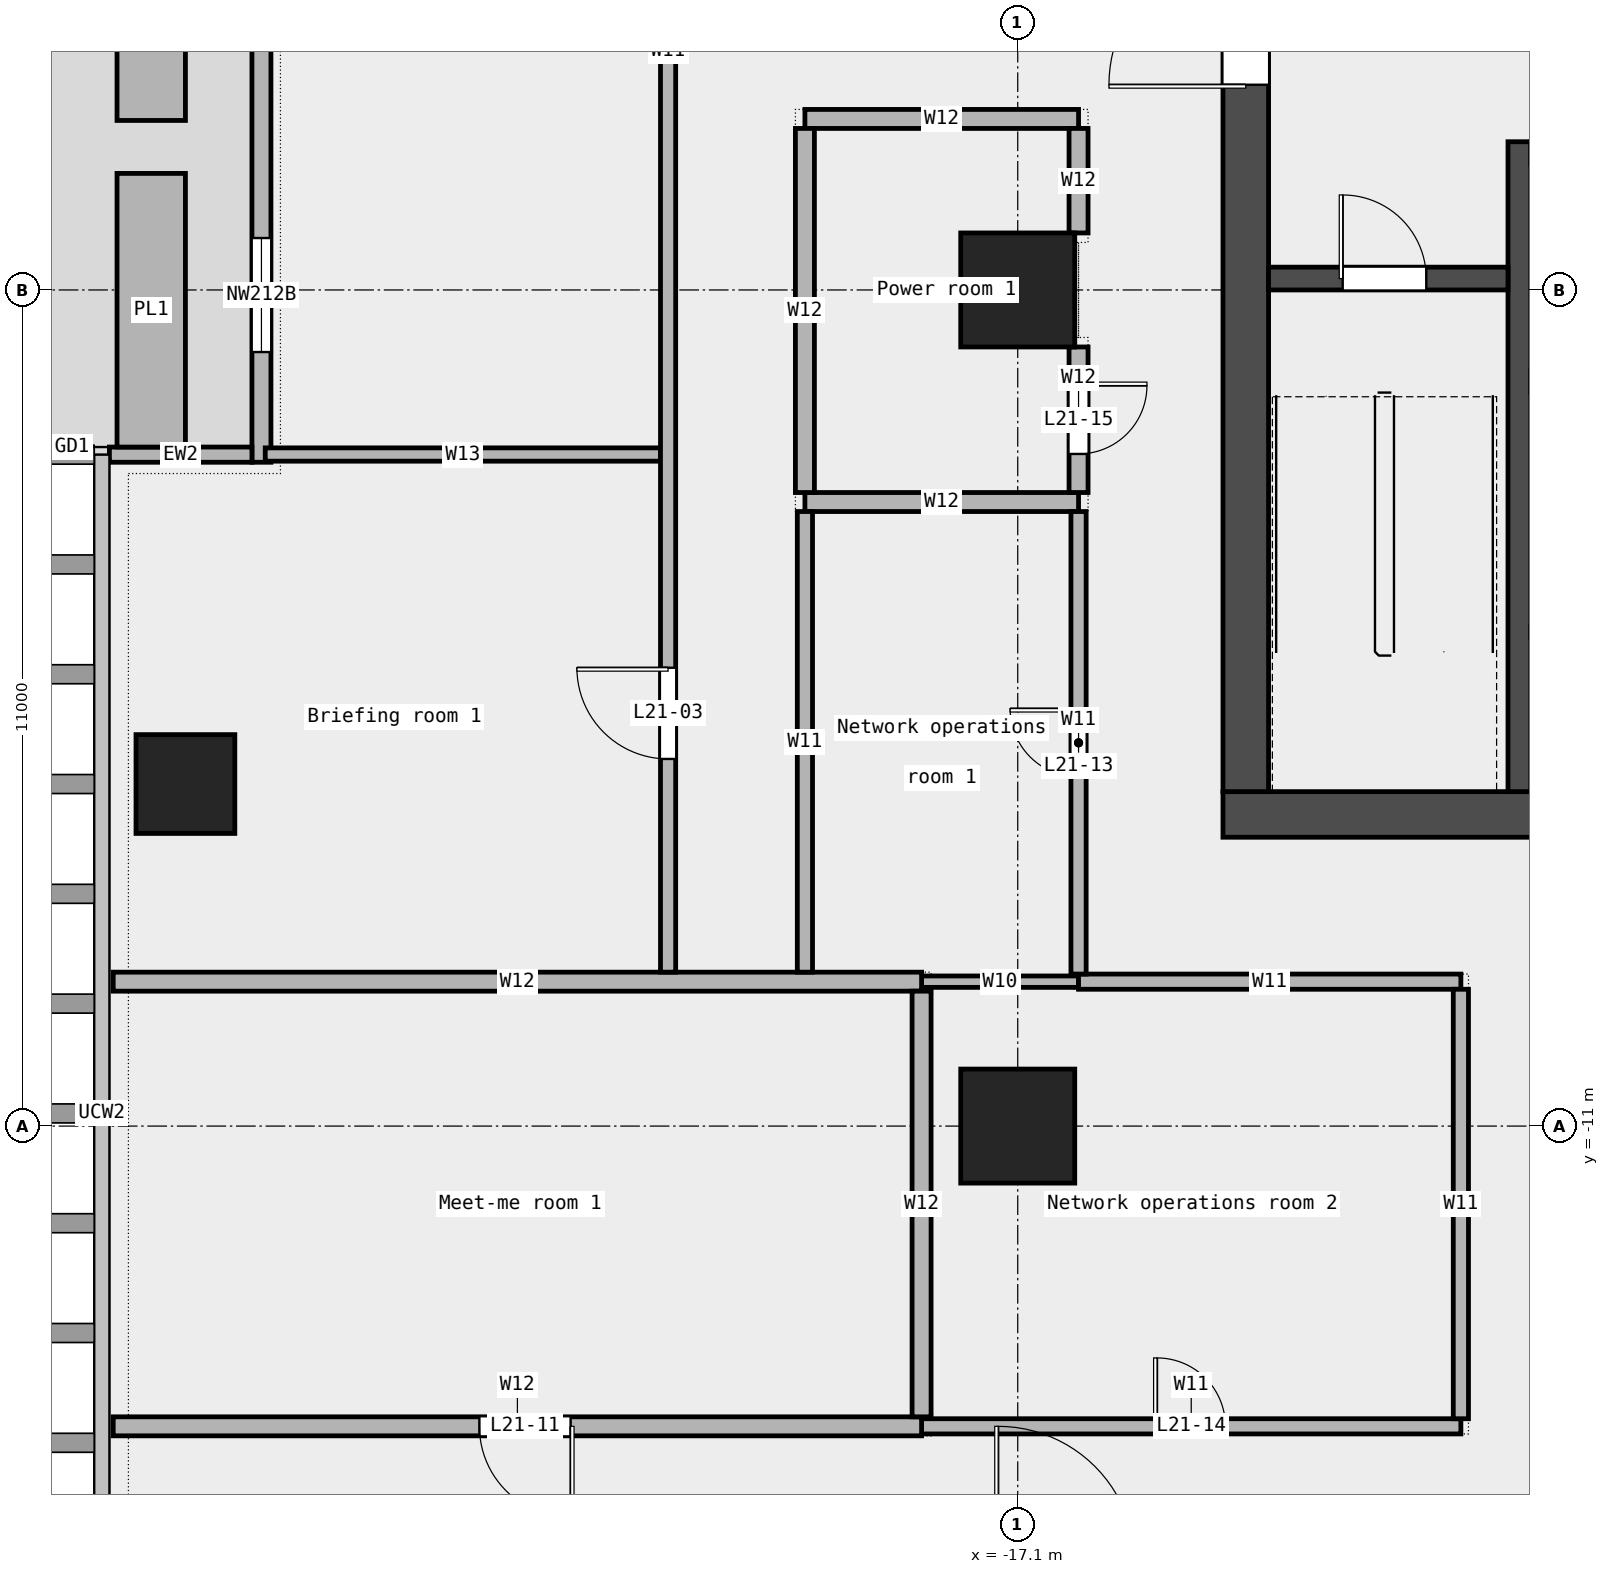
"""IFC4 building model, lengths in metres.
Left out: names, types, materials, properties, quantities, classifications, styles, units other than length and angle.
Written with IfcOpenShell. Run it as: python <this file> out.ifc"""

import sys

from ifc_helpers import new_model, si_unit, direction, frame, frame_2d, origin, origin_2d, place, context, subcontext, project, spatial, rectangle, extrude, element, fill, save


model = new_model("IFC4")
c1 = context("Model", 3, precision=1e-05, world=origin(), true_north=direction((0.0, 1.0)))
c2 = subcontext(c1, "Body", "Model", "MODEL_VIEW")
j1 = project(units=[si_unit("LENGTHUNIT", "METRE"), si_unit("PLANEANGLEUNIT", "RADIAN")], contexts=[c1])
p1 = place(None, origin())
s1 = spatial("IfcSite", under=j1, at=p1, CompositionType="ELEMENT")
p2 = place(p1, origin())
s2 = spatial("IfcBuilding", under=s1, at=p2, CompositionType="ELEMENT")
p3 = place(p2, frame((0.0, 0.0, 108.1)))
s3 = spatial("IfcBuildingStorey", under=s2, at=p3, CompositionType="ELEMENT", Elevation=108.1)
p4 = place(p3, frame((-28.05, -6.5, 0.0), z_axis=(0.0, 0.0, 1.0), x_axis=(1.0, 0.0, 0.0)))
e1 = element("IfcColumn", 1, at=p4, inside=s3, PredefinedType="COLUMN", context=c2, shape_type="SweptSolid", body=[
    extrude(rectangle(XDim=1.3, YDim=1.3, at=origin_2d()), origin(), (0.0, 0.0, 1.0), 4.05),
])
for number, where, z_axis, x_axis in (
    (2, (-17.1, -11.0, 0.0), (0.0, 0.0, 1.0), (1.0, 0.0, 0.0)),
    (3, (-17.1, 0.0, 0.0), (0.0, 0.0, 1.0), (1.0, 0.0, 0.0)),
):
    element("IfcColumn", number, at=place(p3, frame(where, z_axis=z_axis, x_axis=x_axis)), inside=s3, PredefinedType="COLUMN", context=c2, shape_type="SweptSolid", body=[
        extrude(rectangle(XDim=1.5, YDim=1.5, at=origin_2d()), origin(), (0.0, 0.0, 1.0), 4.05),
    ])
p5 = place(p3, frame((-27.05, 10.933, 0.0), z_axis=(0.0, 0.0, 1.0), x_axis=(0.0, -1.0, 0.0)))
e4 = element("IfcWall", 4, at=p5, inside=s3, PredefinedType="STANDARD", context=c2, shape_type="SweptSolid", body=[
    extrude(rectangle(XDim=13.2, YDim=0.25, at=frame_2d((6.6, 0.0))), origin(), (0.0, 0.0, 1.0), 4.05),
])
p6 = place(p5, frame((1.5, 0.0, 0.45)))
e5 = element("IfcOpeningElement", 5, at=p6, cuts=e4, PredefinedType="OPENING", context=c2, shape_type="SweptSolid", body=[
    extrude(rectangle(XDim=1.5, YDim=3.0, at=frame_2d((0.75, 1.5))), frame((0.0, 0.137, 0.0), z_axis=(0.0, -1.0, 0.0), x_axis=(1.0, 0.0, 0.0)), (0.0, 0.0, 1.0), 0.274),
])
p7 = place(p5, frame((5.75, 0.0, 0.0)))
e6 = element("IfcOpeningElement", 6, at=p7, cuts=e4, PredefinedType="OPENING", context=c2, shape_type="SweptSolid", body=[
    extrude(rectangle(XDim=1.8, YDim=2.4, at=frame_2d((0.9, 1.2))), frame((0.0, 0.137, 0.0), z_axis=(0.0, -1.0, 0.0), x_axis=(1.0, 0.0, 0.0)), (0.0, 0.0, 1.0), 0.274),
])
p8 = place(p5, frame((10.25, 0.0, 0.45)))
e7 = element("IfcOpeningElement", 7, at=p8, cuts=e4, PredefinedType="OPENING", context=c2, shape_type="SweptSolid", body=[
    extrude(rectangle(XDim=1.5, YDim=3.0, at=frame_2d((0.75, 1.5))), frame((0.0, 0.137, 0.0), z_axis=(0.0, -1.0, 0.0), x_axis=(1.0, 0.0, 0.0)), (0.0, 0.0, 1.0), 0.274),
])
p9 = place(p3, frame((-29.05, -2.167, 0.0), z_axis=(0.0, 0.0, 1.0), x_axis=(1.0, 0.0, 0.0)))
e8 = element("IfcWall", 8, at=p9, inside=s3, PredefinedType="STANDARD", context=c2, shape_type="SweptSolid", body=[
    extrude(rectangle(XDim=1.875, YDim=0.2, at=frame_2d((0.938, 0.0))), origin(), (0.0, 0.0, 1.0), 4.05),
])
for number, where, z_axis, x_axis in (
    (9, (-28.5, 5.83, 0.0), (0.0, 0.0, 1.0), (0.0, -1.0, 0.0)),
    (10, (-28.5, 1.533, 0.0), (0.0, 0.0, 1.0), (0.0, -1.0, 0.0)),
):
    element("IfcWall", number, at=place(p3, frame(where, z_axis=z_axis, x_axis=x_axis)), inside=s3, PredefinedType="STANDARD", context=c2, shape_type="SweptSolid", body=[
        extrude(rectangle(XDim=3.6, YDim=0.9, at=frame_2d((1.8, 0.0))), origin(), (0.0, 0.0, 1.0), 0.7),
    ])
p10 = place(p3, frame((-18.365, -14.95, 0.0), z_axis=(0.0, 0.0, 1.0), x_axis=(1.0, 0.0, 0.0)))
e11 = element("IfcWall", 11, at=p10, inside=s3, PredefinedType="PARTITIONING", context=c2, shape_type="SweptSolid", body=[
    extrude(rectangle(XDim=7.095, YDim=0.2, at=frame_2d((3.547, 0.0))), origin(), (0.0, 0.0, 1.0), 4.05),
])
p11 = place(p10, frame((3.097, 0.0, 0.0)))
e12 = element("IfcOpeningElement", 12, at=p11, cuts=e11, PredefinedType="OPENING", context=c2, shape_type="SweptSolid", body=[
    extrude(rectangle(XDim=0.9, YDim=2.1, at=frame_2d((0.45, 1.05))), frame((0.0, 0.112, 0.0), z_axis=(0.0, -1.0, 0.0), x_axis=(1.0, 0.0, 0.0)), (0.0, 0.0, 1.0), 0.224),
])
p12 = place(p3, frame((-29.0, -14.95, 0.0), z_axis=(0.0, 0.0, 1.0), x_axis=(1.0, 0.0, 0.0)))
e13 = element("IfcWall", 13, at=p12, inside=s3, PredefinedType="PARTITIONING", context=c2, shape_type="SweptSolid", body=[
    extrude(rectangle(XDim=10.635, YDim=0.25, at=frame_2d((5.317, 0.0))), origin(), (0.0, 0.0, 1.0), 4.05),
])
p13 = place(p12, frame((4.817, 0.0, 0.0)))
e14 = element("IfcOpeningElement", 14, at=p13, cuts=e13, PredefinedType="OPENING", context=c2, shape_type="SweptSolid", body=[
    extrude(rectangle(XDim=1.2, YDim=2.1, at=frame_2d((0.6, 1.05))), frame((0.0, 0.137, 0.0), z_axis=(0.0, -1.0, 0.0), x_axis=(1.0, 0.0, 0.0)), (0.0, 0.0, 1.0), 0.274),
])
p14 = place(p3, frame((-18.365, -9.1, 0.0), z_axis=(0.0, 0.0, 1.0), x_axis=(1.0, 0.0, 0.0)))
e15 = element("IfcWall", 15, at=p14, inside=s3, PredefinedType="PARTITIONING", context=c2, shape_type="SweptSolid", body=[
    extrude(rectangle(XDim=2.065, YDim=0.15, at=frame_2d((1.032, 0.0))), origin(), (0.0, 0.0, 1.0), 4.05),
])
p15 = place(p3, frame((-16.3, -9.1, 0.0), z_axis=(0.0, 0.0, 1.0), x_axis=(1.0, 0.0, 0.0)))
e16 = element("IfcWall", 16, at=p15, inside=s3, PredefinedType="PARTITIONING", context=c2, shape_type="SweptSolid", body=[
    extrude(rectangle(XDim=5.03, YDim=0.2, at=frame_2d((2.515, 0.0))), origin(), (0.0, 0.0, 1.0), 4.05),
])
p16 = place(p3, frame((-29.0, -9.1, 0.0), z_axis=(0.0, 0.0, 1.0), x_axis=(1.0, 0.0, 0.0)))
e17 = element("IfcWall", 17, at=p16, inside=s3, PredefinedType="PARTITIONING", context=c2, shape_type="SweptSolid", body=[
    extrude(rectangle(XDim=10.635, YDim=0.25, at=frame_2d((5.317, 0.0))), origin(), (0.0, 0.0, 1.0), 4.05),
])
p17 = place(p3, frame((-19.9, -2.79, 0.0), z_axis=(0.0, 0.0, 1.0), x_axis=(1.0, 0.0, 0.0)))
e18 = element("IfcWall", 18, at=p17, inside=s3, PredefinedType="PARTITIONING", context=c2, shape_type="SweptSolid", body=[
    extrude(rectangle(XDim=3.6, YDim=0.25, at=frame_2d((1.8, 0.0))), origin(), (0.0, 0.0, 1.0), 4.05),
])
p18 = place(p3, frame((-27.0, -2.165, 0.0), z_axis=(0.0, 0.0, 1.0), x_axis=(1.0, 0.0, 0.0)))
e19 = element("IfcWall", 19, at=p18, inside=s3, PredefinedType="PARTITIONING", context=c2, shape_type="SweptSolid", body=[
    extrude(rectangle(XDim=5.2, YDim=0.175, at=frame_2d((2.6, 0.0))), origin(), (0.0, 0.0, 1.0), 4.05),
])
p19 = place(p3, frame((-19.9, 2.25, 0.0), z_axis=(0.0, 0.0, 1.0), x_axis=(1.0, 0.0, 0.0)))
e20 = element("IfcWall", 20, at=p19, inside=s3, PredefinedType="PARTITIONING", context=c2, shape_type="SweptSolid", body=[
    extrude(rectangle(XDim=3.6, YDim=0.25, at=frame_2d((1.8, 0.0))), origin(), (0.0, 0.0, 1.0), 4.05),
])
p20 = place(p3, frame((-21.7, -8.975, 0.0), z_axis=(0.0, 0.0, 1.0), x_axis=(0.0, 1.0, 0.0)))
e21 = element("IfcWall", 21, at=p20, inside=s3, PredefinedType="PARTITIONING", context=c2, shape_type="SweptSolid", body=[
    extrude(rectangle(XDim=24.25, YDim=0.2, at=frame_2d((12.125, 0.0))), origin(), (0.0, 0.0, 1.0), 4.05),
])
p21 = place(p20, frame((2.805, 0.0, 0.0)))
e22 = element("IfcOpeningElement", 22, at=p21, cuts=e21, PredefinedType="OPENING", context=c2, shape_type="SweptSolid", body=[
    extrude(rectangle(XDim=1.2, YDim=2.1, at=frame_2d((0.6, 1.05))), frame((0.0, 0.112, 0.0), z_axis=(0.0, -1.0, 0.0), x_axis=(1.0, 0.0, 0.0)), (0.0, 0.0, 1.0), 0.224),
])
p22 = place(p20, frame((21.58, 0.0, 0.0)))
e23 = element("IfcOpeningElement", 23, at=p22, cuts=e21, PredefinedType="OPENING", context=c2, shape_type="SweptSolid", body=[
    extrude(rectangle(XDim=0.9, YDim=2.1, at=frame_2d((0.45, 1.05))), frame((0.0, 0.112, 0.0), z_axis=(0.0, -1.0, 0.0), x_axis=(1.0, 0.0, 0.0)), (0.0, 0.0, 1.0), 0.224),
])
p23 = place(p20, frame((12.71, 0.0, 0.0)))
e24 = element("IfcOpeningElement", 24, at=p23, cuts=e21, PredefinedType="OPENING", context=c2, shape_type="SweptSolid", body=[
    extrude(rectangle(XDim=1.2, YDim=2.1, at=frame_2d((0.6, 1.05))), frame((0.0, 0.112, 0.0), z_axis=(0.0, -1.0, 0.0), x_axis=(1.0, 0.0, 0.0)), (0.0, 0.0, 1.0), 0.224),
])
p24 = place(p3, frame((-19.9, -8.975, 0.0), z_axis=(0.0, 0.0, 1.0), x_axis=(0.0, 1.0, 0.0)))
e25 = element("IfcWall", 25, at=p24, inside=s3, PredefinedType="PARTITIONING", context=c2, shape_type="SweptSolid", body=[
    extrude(rectangle(XDim=6.06, YDim=0.2, at=frame_2d((3.03, 0.0))), origin(), (0.0, 0.0, 1.0), 4.05),
])
p25 = place(p3, frame((-19.9, -2.665, 0.0), z_axis=(0.0, 0.0, 1.0), x_axis=(0.0, 1.0, 0.0)))
e26 = element("IfcWall", 26, at=p25, inside=s3, PredefinedType="PARTITIONING", context=c2, shape_type="SweptSolid", body=[
    extrude(rectangle(XDim=4.79, YDim=0.25, at=frame_2d((2.395, 0.0))), origin(), (0.0, 0.0, 1.0), 4.05),
])
p26 = place(p3, frame((-18.365, -14.825, 0.0), z_axis=(0.0, 0.0, 1.0), x_axis=(0.0, 1.0, 0.0)))
e27 = element("IfcWall", 27, at=p26, inside=s3, PredefinedType="PARTITIONING", context=c2, shape_type="SweptSolid", body=[
    extrude(rectangle(XDim=5.6, YDim=0.25, at=frame_2d((2.8, 0.0))), origin(), (0.0, 0.0, 1.0), 4.05),
])
p27 = place(p3, frame((-16.3, -9.0, 0.0), z_axis=(0.0, 0.0, 1.0), x_axis=(0.0, 1.0, 0.0)))
e28 = element("IfcWall", 28, at=p27, inside=s3, PredefinedType="PARTITIONING", context=c2, shape_type="SweptSolid", body=[
    extrude(rectangle(XDim=6.085, YDim=0.2, at=frame_2d((3.042, 0.0))), origin(), (0.0, 0.0, 1.0), 4.05),
])
p28 = place(p27, frame((2.593, 0.0, 0.0)))
e29 = element("IfcOpeningElement", 29, at=p28, cuts=e28, PredefinedType="OPENING", context=c2, shape_type="SweptSolid", body=[
    extrude(rectangle(XDim=0.9, YDim=2.1, at=frame_2d((0.45, 1.05))), frame((0.0, 0.112, 0.0), z_axis=(0.0, -1.0, 0.0), x_axis=(1.0, 0.0, 0.0)), (0.0, 0.0, 1.0), 0.224),
])
p29 = place(p3, frame((-16.3, -2.665, 0.0), z_axis=(0.0, 0.0, 1.0), x_axis=(0.0, 1.0, 0.0)))
e30 = element("IfcWall", 30, at=p29, inside=s3, PredefinedType="PARTITIONING", context=c2, shape_type="SweptSolid", body=[
    extrude(rectangle(XDim=1.915, YDim=0.25, at=frame_2d((0.958, 0.0))), origin(), (0.0, 0.0, 1.0), 4.05),
])
p30 = place(p29, frame((0.508, 0.0, 0.0)))
e31 = element("IfcOpeningElement", 31, at=p30, cuts=e30, PredefinedType="OPENING", context=c2, shape_type="SweptSolid", body=[
    extrude(rectangle(XDim=0.9, YDim=2.1, at=frame_2d((0.45, 1.05))), frame((0.0, 0.137, 0.0), z_axis=(0.0, -1.0, 0.0), x_axis=(1.0, 0.0, 0.0)), (0.0, 0.0, 1.0), 0.274),
])
p31 = place(p3, frame((-16.3, 0.75, 0.0), z_axis=(0.0, 0.0, 1.0), x_axis=(0.0, 1.0, 0.0)))
e32 = element("IfcWall", 32, at=p31, inside=s3, PredefinedType="PARTITIONING", context=c2, shape_type="SweptSolid", body=[
    extrude(rectangle(XDim=1.375, YDim=0.25, at=frame_2d((0.688, 0.0))), origin(), (0.0, 0.0, 1.0), 4.05),
])
p32 = place(p3, frame((-11.27, -14.85, 0.0), z_axis=(0.0, 0.0, 1.0), x_axis=(0.0, 1.0, 0.0)))
e33 = element("IfcWall", 33, at=p32, inside=s3, PredefinedType="PARTITIONING", context=c2, shape_type="SweptSolid", body=[
    extrude(rectangle(XDim=5.65, YDim=0.2, at=frame_2d((2.825, 0.0))), origin(), (0.0, 0.0, 1.0), 4.05),
])
p33 = place(p3, frame((-14.4, -6.9, 0.0), z_axis=(0.0, 0.0, 1.0), x_axis=(1.0, 0.0, 0.0)))
e34 = element("IfcWall", 34, at=p33, inside=s3, PredefinedType="SHEAR", context=c2, shape_type="SweptSolid", body=[
    extrude(rectangle(XDim=28.8, YDim=0.6, at=frame_2d((14.4, 0.0))), origin(), (0.0, 0.0, 1.0), 4.2),
])
p34 = place(p33, frame((7.05, 0.0, 0.0)))
e35 = element("IfcOpeningElement", 35, at=p34, cuts=e34, PredefinedType="OPENING", context=c2, shape_type="SweptSolid", body=[
    extrude(rectangle(XDim=1.2, YDim=2.1, at=frame_2d((0.6, 1.05))), frame((0.0, 0.312, 0.0), z_axis=(0.0, -1.0, 0.0), x_axis=(1.0, 0.0, 0.0)), (0.0, 0.0, 1.0), 0.624),
])
p35 = place(p33, frame((11.837, 0.0, 0.0)))
e36 = element("IfcOpeningElement", 36, at=p35, cuts=e34, PredefinedType="OPENING", context=c2, shape_type="SweptSolid", body=[
    extrude(rectangle(XDim=1.0, YDim=2.1, at=frame_2d((0.5, 1.05))), frame((0.0, 0.312, 0.0), z_axis=(0.0, -1.0, 0.0), x_axis=(1.0, 0.0, 0.0)), (0.0, 0.0, 1.0), 0.624),
])
p36 = place(p33, frame((13.712, 0.0, 0.0)))
e37 = element("IfcOpeningElement", 37, at=p36, cuts=e34, PredefinedType="OPENING", context=c2, shape_type="SweptSolid", body=[
    extrude(rectangle(XDim=1.0, YDim=2.1, at=frame_2d((0.5, 1.05))), frame((0.0, 0.312, 0.0), z_axis=(0.0, -1.0, 0.0), x_axis=(1.0, 0.0, 0.0)), (0.0, 0.0, 1.0), 0.624),
])
p37 = place(p33, frame((15.587, 0.0, 0.0)))
e38 = element("IfcOpeningElement", 38, at=p37, cuts=e34, PredefinedType="OPENING", context=c2, shape_type="SweptSolid", body=[
    extrude(rectangle(XDim=1.0, YDim=2.1, at=frame_2d((0.5, 1.05))), frame((0.0, 0.312, 0.0), z_axis=(0.0, -1.0, 0.0), x_axis=(1.0, 0.0, 0.0)), (0.0, 0.0, 1.0), 0.624),
])
p38 = place(p33, frame((18.75, 0.0, 0.0)))
e39 = element("IfcOpeningElement", 39, at=p38, cuts=e34, PredefinedType="OPENING", context=c2, shape_type="SweptSolid", body=[
    extrude(rectangle(XDim=1.8, YDim=2.1, at=frame_2d((0.9, 1.05))), frame((0.0, 0.312, 0.0), z_axis=(0.0, -1.0, 0.0), x_axis=(1.0, 0.0, 0.0)), (0.0, 0.0, 1.0), 0.624),
])
p39 = place(p33, frame((23.087, 0.0, 0.0)))
e40 = element("IfcOpeningElement", 40, at=p39, cuts=e34, PredefinedType="OPENING", context=c2, shape_type="SweptSolid", body=[
    extrude(rectangle(XDim=1.0, YDim=2.1, at=frame_2d((0.5, 1.05))), frame((0.0, 0.312, 0.0), z_axis=(0.0, -1.0, 0.0), x_axis=(1.0, 0.0, 0.0)), (0.0, 0.0, 1.0), 0.624),
])
p40 = place(p3, frame((-14.1, -6.6, 0.0), z_axis=(0.0, 0.0, 1.0), x_axis=(0.0, 1.0, 0.0)))
e41 = element("IfcWall", 41, at=p40, inside=s3, PredefinedType="SHEAR", context=c2, shape_type="SweptSolid", body=[
    extrude(rectangle(XDim=19.5, YDim=0.6, at=frame_2d((9.75, 0.0))), origin(), (0.0, 0.0, 1.0), 4.2),
])
p41 = place(p40, frame((9.3, 0.0, 0.0)))
e42 = element("IfcOpeningElement", 42, at=p41, cuts=e41, PredefinedType="OPENING", context=c2, shape_type="SweptSolid", body=[
    extrude(rectangle(XDim=1.8, YDim=2.1, at=frame_2d((0.9, 1.05))), frame((0.0, 0.312, 0.0), z_axis=(0.0, -1.0, 0.0), x_axis=(1.0, 0.0, 0.0)), (0.0, 0.0, 1.0), 0.624),
])
p42 = place(p3, frame((-10.5, -6.6, 0.0), z_axis=(0.0, 0.0, 1.0), x_axis=(0.0, 1.0, 0.0)))
e43 = element("IfcWall", 43, at=p42, inside=s3, PredefinedType="SHEAR", context=c2, shape_type="SweptSolid", body=[
    extrude(rectangle(XDim=8.55, YDim=0.3, at=frame_2d((4.275, 0.0))), origin(), (0.0, 0.0, 1.0), 4.2),
])
p43 = place(p3, frame((-13.8, 0.15, 0.0), z_axis=(0.0, 0.0, 1.0), x_axis=(1.0, 0.0, 0.0)))
e44 = element("IfcWall", 44, at=p43, inside=s3, PredefinedType="SOLIDWALL", context=c2, shape_type="SweptSolid", body=[
    extrude(rectangle(XDim=3.15, YDim=0.3, at=frame_2d((1.575, 0.0))), origin(), (0.0, 0.0, 1.0), 4.2),
])
p44 = place(p43, frame((0.975, 0.0, 0.0)))
e45 = element("IfcOpeningElement", 45, at=p44, cuts=e44, PredefinedType="OPENING", context=c2, shape_type="SweptSolid", body=[
    extrude(rectangle(XDim=1.1, YDim=2.1, at=frame_2d((0.55, 1.05))), frame((0.0, 0.162, 0.0), z_axis=(0.0, -1.0, 0.0), x_axis=(1.0, 0.0, 0.0)), (0.0, 0.0, 1.0), 0.324),
])
p45 = place(p8, origin())
e46 = element("IfcWindow", 46, at=p45, inside=s3, PartitioningType="SINGLE_PANEL", PredefinedType="WINDOW", context=c2, shape_type="SweptSolid", body=[
    extrude(rectangle(XDim=1.5, YDim=3.0, at=frame_2d((0.75, 1.5))), frame((0.0, 0.03, 0.0), z_axis=(0.0, -1.0, 0.0), x_axis=(1.0, 0.0, 0.0)), (0.0, 0.0, 1.0), 0.06),
])
fill(e7, e46)
p46 = place(p21, origin())
e47 = element("IfcDoor", 47, at=p46, inside=s3, OperationType="SINGLE_SWING_RIGHT", PredefinedType="DOOR", context=c2, shape_type="SweptSolid", body=[
    extrude(rectangle(XDim=1.2, YDim=2.1, at=frame_2d((0.6, 1.05))), frame((0.0, 0.025, 0.0), z_axis=(0.0, -1.0, 0.0), x_axis=(1.0, 0.0, 0.0)), (0.0, 0.0, 1.0), 0.05),
])
fill(e22, e47)
p47 = place(p13, origin())
e48 = element("IfcDoor", 48, at=p47, inside=s3, OperationType="SINGLE_SWING_LEFT", PredefinedType="DOOR", context=c2, shape_type="SweptSolid", body=[
    extrude(rectangle(XDim=1.2, YDim=2.1, at=frame_2d((0.6, 1.05))), frame((0.0, 0.025, 0.0), z_axis=(0.0, -1.0, 0.0), x_axis=(1.0, 0.0, 0.0)), (0.0, 0.0, 1.0), 0.05),
])
fill(e14, e48)
p48 = place(p28, origin())
e49 = element("IfcDoor", 49, at=p48, inside=s3, OperationType="SINGLE_SWING_RIGHT", PredefinedType="DOOR", context=c2, shape_type="SweptSolid", body=[
    extrude(rectangle(XDim=0.9, YDim=2.1, at=frame_2d((0.45, 1.05))), frame((0.0, 0.025, 0.0), z_axis=(0.0, -1.0, 0.0), x_axis=(1.0, 0.0, 0.0)), (0.0, 0.0, 1.0), 0.05),
])
fill(e29, e49)
p49 = place(p11, origin())
e50 = element("IfcDoor", 50, at=p49, inside=s3, OperationType="SINGLE_SWING_LEFT", PredefinedType="DOOR", context=c2, shape_type="SweptSolid", body=[
    extrude(rectangle(XDim=0.9, YDim=2.1, at=frame_2d((0.45, 1.05))), frame((0.0, 0.025, 0.0), z_axis=(0.0, -1.0, 0.0), x_axis=(1.0, 0.0, 0.0)), (0.0, 0.0, 1.0), 0.05),
])
fill(e12, e50)
p50 = place(p30, origin())
e51 = element("IfcDoor", 51, at=p50, inside=s3, OperationType="SINGLE_SWING_LEFT", PredefinedType="DOOR", context=c2, shape_type="SweptSolid", body=[
    extrude(rectangle(XDim=0.9, YDim=2.1, at=frame_2d((0.45, 1.05))), frame((0.0, 0.025, 0.0), z_axis=(0.0, -1.0, 0.0), x_axis=(1.0, 0.0, 0.0)), (0.0, 0.0, 1.0), 0.05),
])
fill(e31, e51)
p51 = place(p44, origin())
e52 = element("IfcDoor", 52, at=p51, inside=s3, OperationType="SINGLE_SWING_LEFT", PredefinedType="DOOR", context=c2, shape_type="SweptSolid", body=[
    extrude(rectangle(XDim=1.1, YDim=2.1, at=frame_2d((0.55, 1.05))), frame((0.0, 0.025, 0.0), z_axis=(0.0, -1.0, 0.0), x_axis=(1.0, 0.0, 0.0)), (0.0, 0.0, 1.0), 0.05),
])
fill(e45, e52)
p52 = place(p41, origin())
e53 = element("IfcDoor", 53, at=p52, inside=s3, OperationType="DOUBLE_DOOR_SINGLE_SWING", PredefinedType="DOOR", context=c2, shape_type="SweptSolid", body=[
    extrude(rectangle(XDim=1.8, YDim=2.1, at=frame_2d((0.9, 1.05))), frame((0.0, 0.025, 0.0), z_axis=(0.0, -1.0, 0.0), x_axis=(1.0, 0.0, 0.0)), (0.0, 0.0, 1.0), 0.05),
])
fill(e42, e53)
save(model, sys.argv[1])
